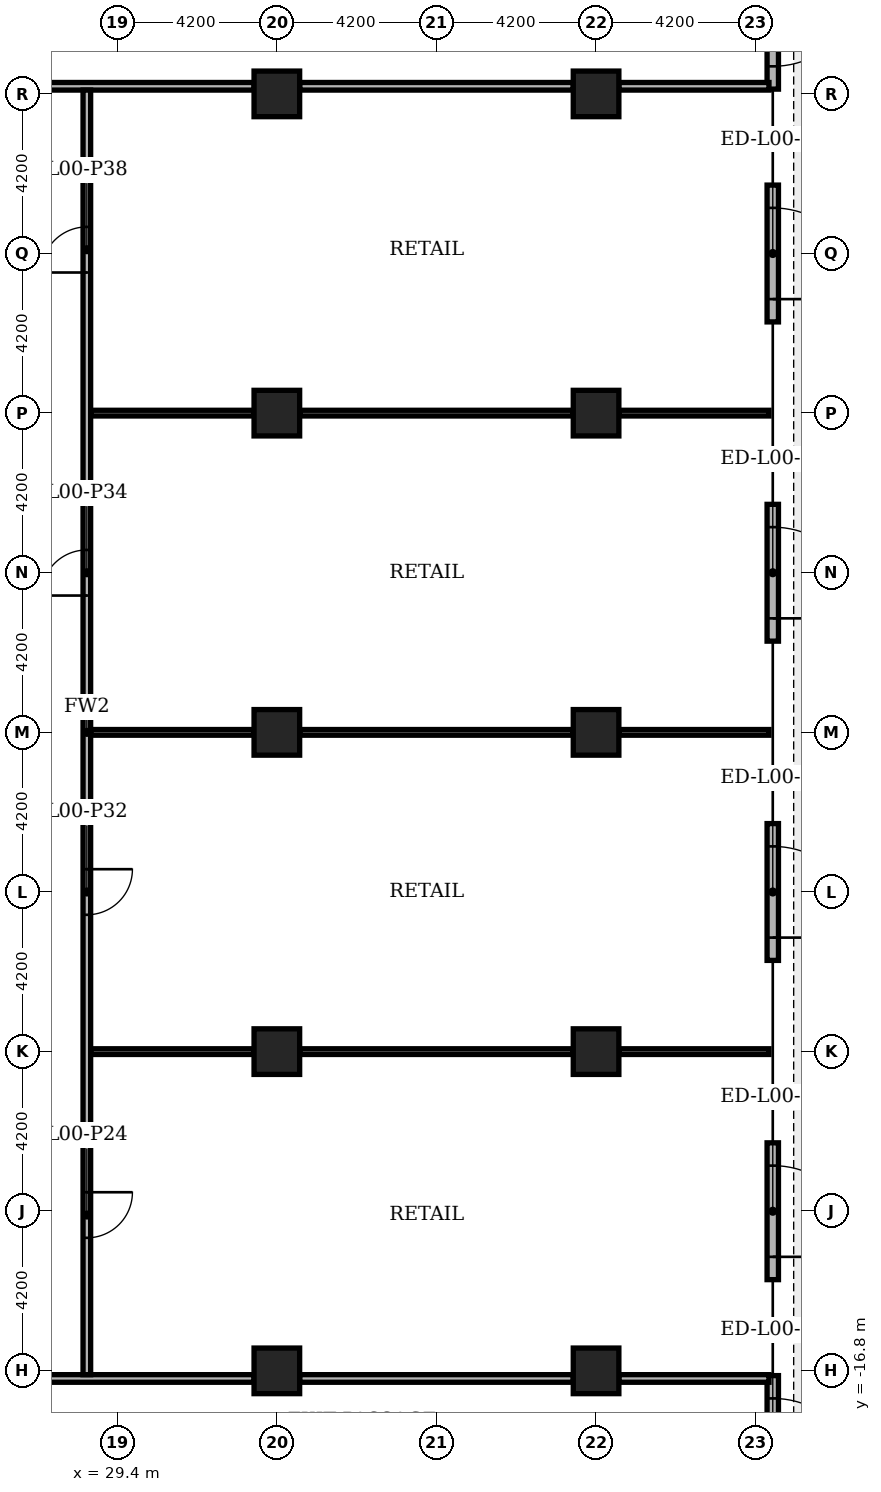
"""IFC4 building model, lengths in metres.
Left out: names, types, materials, properties, quantities, classifications, styles, units other than length and angle.
Written with IfcOpenShell. Run it as: python <this file> out.ifc"""

import sys

from ifc_helpers import new_model, si_unit, direction, frame, frame_2d, origin, origin_2d, place, context, subcontext, project, spatial, rectangle, extrude, element, fill, save


model = new_model("IFC4")
c1 = context("Model", 3, precision=1e-05, world=origin(), true_north=direction((0.0, 1.0)))
c2 = subcontext(c1, "Body", "Model", "MODEL_VIEW")
j1 = project(units=[si_unit("LENGTHUNIT", "METRE"), si_unit("PLANEANGLEUNIT", "RADIAN")], contexts=[c1])
p1 = place(None, origin())
s1 = spatial("IfcSite", under=j1, at=p1, CompositionType="ELEMENT")
p2 = place(p1, origin())
s2 = spatial("IfcBuilding", under=s1, at=p2, CompositionType="ELEMENT")
p3 = place(p2, origin())
s3 = spatial("IfcBuildingStorey", under=s2, at=p3, CompositionType="ELEMENT", Elevation=0.0)
for number, where, z_axis, x_axis in (
    (1, (33.6, 0.0, 0.0), (0.0, 0.0, 1.0), (1.0, 0.0, 0.0)),
    (2, (33.6, 8.4, 0.0), (0.0, 0.0, 1.0), (1.0, 0.0, 0.0)),
    (3, (33.6, 16.8, 0.0), (0.0, 0.0, 1.0), (1.0, 0.0, 0.0)),
    (4, (33.6, -8.4, 0.0), (0.0, 0.0, 1.0), (1.0, 0.0, 0.0)),
    (5, (33.6, -16.8, 0.0), (0.0, 0.0, 1.0), (1.0, 0.0, 0.0)),
    (6, (42.0, 0.0, 0.0), (0.0, 0.0, 1.0), (1.0, 0.0, 0.0)),
    (7, (42.0, 8.4, 0.0), (0.0, 0.0, 1.0), (1.0, 0.0, 0.0)),
    (8, (42.0, 16.8, 0.0), (0.0, 0.0, 1.0), (1.0, 0.0, 0.0)),
    (9, (42.0, -8.4, 0.0), (0.0, 0.0, 1.0), (1.0, 0.0, 0.0)),
    (10, (42.0, -16.8, 0.0), (0.0, 0.0, 1.0), (1.0, 0.0, 0.0)),
):
    element("IfcColumn", number, at=place(p3, frame(where, z_axis=z_axis, x_axis=x_axis)), inside=s3, PredefinedType="COLUMN", context=c2, shape_type="SweptSolid", body=[
        extrude(rectangle(XDim=1.2, YDim=1.2, at=origin_2d()), origin(), (0.0, 0.0, 1.0), 7.2),
    ])
p4 = place(p3, frame((46.65, -20.525, 0.0), z_axis=(0.0, 0.0, 1.0), x_axis=(0.0, 1.0, 0.0)))
e11 = element("IfcWall", 11, at=p4, inside=s3, PredefinedType="STANDARD", context=c2, shape_type="SweptSolid", body=[
    extrude(rectangle(XDim=3.6, YDim=0.3, at=frame_2d((1.8, 0.0))), origin(), (0.0, 0.0, 1.0), 6.78),
])
p5 = place(p4, frame((0.6, 0.0, 0.0)))
e12 = element("IfcOpeningElement", 12, at=p5, cuts=e11, PredefinedType="OPENING", context=c2, shape_type="SweptSolid", body=[
    extrude(rectangle(XDim=2.4, YDim=2.4, at=frame_2d((1.2, 1.2))), frame((0.0, 0.16, 0.0), z_axis=(0.0, -1.0, 0.0), x_axis=(1.0, 0.0, 0.0)), (0.0, 0.0, 1.0), 0.32),
])
p6 = place(p3, frame((46.65, -14.4, 0.0), z_axis=(0.0, 0.0, 1.0), x_axis=(0.0, 1.0, 0.0)))
e13 = element("IfcWall", 13, at=p6, inside=s3, PredefinedType="STANDARD", context=c2, shape_type="SweptSolid", body=[
    extrude(rectangle(XDim=3.6, YDim=0.3, at=frame_2d((1.8, 0.0))), origin(), (0.0, 0.0, 1.0), 6.78),
])
p7 = place(p6, frame((0.6, 0.0, 0.0)))
e14 = element("IfcOpeningElement", 14, at=p7, cuts=e13, PredefinedType="OPENING", context=c2, shape_type="SweptSolid", body=[
    extrude(rectangle(XDim=2.4, YDim=2.4, at=frame_2d((1.2, 1.2))), frame((0.0, 0.16, 0.0), z_axis=(0.0, -1.0, 0.0), x_axis=(1.0, 0.0, 0.0)), (0.0, 0.0, 1.0), 0.32),
])
p8 = place(p3, frame((46.65, -6.0, 0.0), z_axis=(0.0, 0.0, 1.0), x_axis=(0.0, 1.0, 0.0)))
e15 = element("IfcWall", 15, at=p8, inside=s3, PredefinedType="STANDARD", context=c2, shape_type="SweptSolid", body=[
    extrude(rectangle(XDim=3.6, YDim=0.3, at=frame_2d((1.8, 0.0))), origin(), (0.0, 0.0, 1.0), 6.78),
])
p9 = place(p8, frame((0.6, 0.0, 0.0)))
e16 = element("IfcOpeningElement", 16, at=p9, cuts=e15, PredefinedType="OPENING", context=c2, shape_type="SweptSolid", body=[
    extrude(rectangle(XDim=2.4, YDim=2.4, at=frame_2d((1.2, 1.2))), frame((0.0, 0.16, 0.0), z_axis=(0.0, -1.0, 0.0), x_axis=(1.0, 0.0, 0.0)), (0.0, 0.0, 1.0), 0.32),
])
p10 = place(p3, frame((46.65, 2.4, 0.0), z_axis=(0.0, 0.0, 1.0), x_axis=(0.0, 1.0, 0.0)))
e17 = element("IfcWall", 17, at=p10, inside=s3, PredefinedType="STANDARD", context=c2, shape_type="SweptSolid", body=[
    extrude(rectangle(XDim=3.6, YDim=0.3, at=frame_2d((1.8, 0.0))), origin(), (0.0, 0.0, 1.0), 6.78),
])
p11 = place(p10, frame((0.6, 0.0, 0.0)))
e18 = element("IfcOpeningElement", 18, at=p11, cuts=e17, PredefinedType="OPENING", context=c2, shape_type="SweptSolid", body=[
    extrude(rectangle(XDim=2.4, YDim=2.4, at=frame_2d((1.2, 1.2))), frame((0.0, 0.16, 0.0), z_axis=(0.0, -1.0, 0.0), x_axis=(1.0, 0.0, 0.0)), (0.0, 0.0, 1.0), 0.32),
])
p12 = place(p3, frame((46.65, 10.8, 0.0), z_axis=(0.0, 0.0, 1.0), x_axis=(0.0, 1.0, 0.0)))
e19 = element("IfcWall", 19, at=p12, inside=s3, PredefinedType="STANDARD", context=c2, shape_type="SweptSolid", body=[
    extrude(rectangle(XDim=3.6, YDim=0.3, at=frame_2d((1.8, 0.0))), origin(), (0.0, 0.0, 1.0), 6.78),
])
p13 = place(p12, frame((0.6, 0.0, 0.0)))
e20 = element("IfcOpeningElement", 20, at=p13, cuts=e19, PredefinedType="OPENING", context=c2, shape_type="SweptSolid", body=[
    extrude(rectangle(XDim=2.4, YDim=2.4, at=frame_2d((1.2, 1.2))), frame((0.0, 0.16, 0.0), z_axis=(0.0, -1.0, 0.0), x_axis=(1.0, 0.0, 0.0)), (0.0, 0.0, 1.0), 0.32),
])
p14 = place(p3, frame((46.65, 16.925, 0.0), z_axis=(0.0, 0.0, 1.0), x_axis=(0.0, 1.0, 0.0)))
e21 = element("IfcWall", 21, at=p14, inside=s3, PredefinedType="STANDARD", context=c2, shape_type="SweptSolid", body=[
    extrude(rectangle(XDim=3.6, YDim=0.3, at=frame_2d((1.8, 0.0))), origin(), (0.0, 0.0, 1.0), 6.78),
])
p15 = place(p14, frame((0.6, 0.0, 0.0)))
e22 = element("IfcOpeningElement", 22, at=p15, cuts=e21, PredefinedType="OPENING", context=c2, shape_type="SweptSolid", body=[
    extrude(rectangle(XDim=2.4, YDim=2.4, at=frame_2d((1.2, 1.2))), frame((0.0, 0.16, 0.0), z_axis=(0.0, -1.0, 0.0), x_axis=(1.0, 0.0, 0.0)), (0.0, 0.0, 1.0), 0.32),
])
for number, where, z_axis, x_axis in (
    (23, (25.8, -17.0, 0.0), (0.0, 0.0, 1.0), (1.0, 0.0, 0.0)),
    (24, (34.2, -17.0, 0.0), (0.0, 0.0, 1.0), (1.0, 0.0, 0.0)),
):
    element("IfcWall", number, at=place(p3, frame(where, z_axis=z_axis, x_axis=x_axis)), inside=s3, PredefinedType="PARTITIONING", context=c2, shape_type="SweptSolid", body=[
        extrude(rectangle(XDim=7.2, YDim=0.2, at=frame_2d((3.6, 0.0))), origin(), (0.0, 0.0, 1.0), 6.48),
    ])
p16 = place(p3, frame((42.6, -17.0, 0.0), z_axis=(0.0, 0.0, 1.0), x_axis=(1.0, 0.0, 0.0)))
e25 = element("IfcWall", 25, at=p16, inside=s3, PredefinedType="PARTITIONING", context=c2, shape_type="SweptSolid", body=[
    extrude(rectangle(XDim=3.95, YDim=0.2, at=frame_2d((1.975, 0.0))), origin(), (0.0, 0.0, 1.0), 6.48),
])
p17 = place(p3, frame((28.7, -8.4, 0.0), z_axis=(0.0, 0.0, 1.0), x_axis=(1.0, 0.0, 0.0)))
e26 = element("IfcWall", 26, at=p17, inside=s3, PredefinedType="PARTITIONING", context=c2, shape_type="SweptSolid", body=[
    extrude(rectangle(XDim=4.3, YDim=0.15, at=frame_2d((2.15, 0.0))), origin(), (0.0, 0.0, 1.0), 6.48),
])
p18 = place(p3, frame((34.2, -8.4, 0.0), z_axis=(0.0, 0.0, 1.0), x_axis=(1.0, 0.0, 0.0)))
e27 = element("IfcWall", 27, at=p18, inside=s3, PredefinedType="PARTITIONING", context=c2, shape_type="SweptSolid", body=[
    extrude(rectangle(XDim=7.2, YDim=0.15, at=frame_2d((3.6, 0.0))), origin(), (0.0, 0.0, 1.0), 6.48),
])
p19 = place(p3, frame((42.6, -8.4, 0.0), z_axis=(0.0, 0.0, 1.0), x_axis=(1.0, 0.0, 0.0)))
e28 = element("IfcWall", 28, at=p19, inside=s3, PredefinedType="PARTITIONING", context=c2, shape_type="SweptSolid", body=[
    extrude(rectangle(XDim=3.95, YDim=0.15, at=frame_2d((1.975, 0.0))), origin(), (0.0, 0.0, 1.0), 6.48),
])
p20 = place(p3, frame((28.7, 0.0, 0.0), z_axis=(0.0, 0.0, 1.0), x_axis=(1.0, 0.0, 0.0)))
e29 = element("IfcWall", 29, at=p20, inside=s3, PredefinedType="PARTITIONING", context=c2, shape_type="SweptSolid", body=[
    extrude(rectangle(XDim=4.3, YDim=0.15, at=frame_2d((2.15, 0.0))), origin(), (0.0, 0.0, 1.0), 6.48),
])
p21 = place(p3, frame((34.2, 0.0, 0.0), z_axis=(0.0, 0.0, 1.0), x_axis=(1.0, 0.0, 0.0)))
e30 = element("IfcWall", 30, at=p21, inside=s3, PredefinedType="PARTITIONING", context=c2, shape_type="SweptSolid", body=[
    extrude(rectangle(XDim=7.2, YDim=0.15, at=frame_2d((3.6, 0.0))), origin(), (0.0, 0.0, 1.0), 6.48),
])
p22 = place(p3, frame((42.6, 0.0, 0.0), z_axis=(0.0, 0.0, 1.0), x_axis=(1.0, 0.0, 0.0)))
e31 = element("IfcWall", 31, at=p22, inside=s3, PredefinedType="PARTITIONING", context=c2, shape_type="SweptSolid", body=[
    extrude(rectangle(XDim=3.95, YDim=0.15, at=frame_2d((1.975, 0.0))), origin(), (0.0, 0.0, 1.0), 6.48),
])
p23 = place(p3, frame((28.7, 8.4, 0.0), z_axis=(0.0, 0.0, 1.0), x_axis=(1.0, 0.0, 0.0)))
e32 = element("IfcWall", 32, at=p23, inside=s3, PredefinedType="PARTITIONING", context=c2, shape_type="SweptSolid", body=[
    extrude(rectangle(XDim=4.3, YDim=0.15, at=frame_2d((2.15, 0.0))), origin(), (0.0, 0.0, 1.0), 6.48),
])
p24 = place(p3, frame((34.2, 8.4, 0.0), z_axis=(0.0, 0.0, 1.0), x_axis=(1.0, 0.0, 0.0)))
e33 = element("IfcWall", 33, at=p24, inside=s3, PredefinedType="PARTITIONING", context=c2, shape_type="SweptSolid", body=[
    extrude(rectangle(XDim=7.2, YDim=0.15, at=frame_2d((3.6, 0.0))), origin(), (0.0, 0.0, 1.0), 6.48),
])
p25 = place(p3, frame((42.6, 8.4, 0.0), z_axis=(0.0, 0.0, 1.0), x_axis=(1.0, 0.0, 0.0)))
e34 = element("IfcWall", 34, at=p25, inside=s3, PredefinedType="PARTITIONING", context=c2, shape_type="SweptSolid", body=[
    extrude(rectangle(XDim=3.95, YDim=0.15, at=frame_2d((1.975, 0.0))), origin(), (0.0, 0.0, 1.0), 6.48),
])
for number, where, z_axis, x_axis in (
    (35, (25.8, 17.0, 0.0), (0.0, 0.0, 1.0), (1.0, 0.0, 0.0)),
    (36, (34.2, 17.0, 0.0), (0.0, 0.0, 1.0), (1.0, 0.0, 0.0)),
):
    element("IfcWall", number, at=place(p3, frame(where, z_axis=z_axis, x_axis=x_axis)), inside=s3, PredefinedType="PARTITIONING", context=c2, shape_type="SweptSolid", body=[
        extrude(rectangle(XDim=7.2, YDim=0.2, at=frame_2d((3.6, 0.0))), origin(), (0.0, 0.0, 1.0), 6.48),
    ])
p26 = place(p3, frame((42.6, 17.0, 0.0), z_axis=(0.0, 0.0, 1.0), x_axis=(1.0, 0.0, 0.0)))
e37 = element("IfcWall", 37, at=p26, inside=s3, PredefinedType="PARTITIONING", context=c2, shape_type="SweptSolid", body=[
    extrude(rectangle(XDim=3.95, YDim=0.2, at=frame_2d((1.975, 0.0))), origin(), (0.0, 0.0, 1.0), 6.48),
])
p27 = place(p3, frame((28.6, -16.9, 0.0), z_axis=(0.0, 0.0, 1.0), x_axis=(0.0, 1.0, 0.0)))
e38 = element("IfcWall", 38, at=p27, inside=s3, PredefinedType="PARTITIONING", context=c2, shape_type="SweptSolid", body=[
    extrude(rectangle(XDim=33.8, YDim=0.2, at=frame_2d((16.9, 0.0))), origin(), (0.0, 0.0, 1.0), 6.48),
])
p28 = place(p27, frame((3.6, 0.0, 0.0)))
e39 = element("IfcOpeningElement", 39, at=p28, cuts=e38, PredefinedType="OPENING", context=c2, shape_type="SweptSolid", body=[
    extrude(rectangle(XDim=1.2, YDim=2.2, at=frame_2d((0.6, 1.1))), frame((0.0, 0.11, 0.0), z_axis=(0.0, -1.0, 0.0), x_axis=(1.0, 0.0, 0.0)), (0.0, 0.0, 1.0), 0.22),
])
p29 = place(p27, frame((12.1, 0.0, 0.0)))
e40 = element("IfcOpeningElement", 40, at=p29, cuts=e38, PredefinedType="OPENING", context=c2, shape_type="SweptSolid", body=[
    extrude(rectangle(XDim=1.2, YDim=2.2, at=frame_2d((0.6, 1.1))), frame((0.0, 0.11, 0.0), z_axis=(0.0, -1.0, 0.0), x_axis=(1.0, 0.0, 0.0)), (0.0, 0.0, 1.0), 0.22),
])
p30 = place(p27, frame((20.5, 0.0, 0.0)))
e41 = element("IfcOpeningElement", 41, at=p30, cuts=e38, PredefinedType="OPENING", context=c2, shape_type="SweptSolid", body=[
    extrude(rectangle(XDim=1.2, YDim=2.2, at=frame_2d((0.6, 1.1))), frame((0.0, 0.11, 0.0), z_axis=(0.0, -1.0, 0.0), x_axis=(1.0, 0.0, 0.0)), (0.0, 0.0, 1.0), 0.22),
])
p31 = place(p27, frame((29.0, 0.0, 0.0)))
e42 = element("IfcOpeningElement", 42, at=p31, cuts=e38, PredefinedType="OPENING", context=c2, shape_type="SweptSolid", body=[
    extrude(rectangle(XDim=1.2, YDim=2.2, at=frame_2d((0.6, 1.1))), frame((0.0, 0.11, 0.0), z_axis=(0.0, -1.0, 0.0), x_axis=(1.0, 0.0, 0.0)), (0.0, 0.0, 1.0), 0.22),
])
p32 = place(p5, frame((2.4, 0.0, 0.0), z_axis=(0.0, 0.0, 1.0), x_axis=(-1.0, 0.0, 0.0)))
e43 = element("IfcDoor", 43, at=p32, inside=s3, OperationType="SINGLE_SWING_LEFT", PredefinedType="DOOR", context=c2, shape_type="SweptSolid", body=[
    extrude(rectangle(XDim=2.4, YDim=2.4, at=frame_2d((1.2, 1.2))), frame((0.0, 0.025, 0.0), z_axis=(0.0, -1.0, 0.0), x_axis=(1.0, 0.0, 0.0)), (0.0, 0.0, 1.0), 0.05),
])
fill(e12, e43)
p33 = place(p7, frame((2.4, 0.0, 0.0), z_axis=(0.0, 0.0, 1.0), x_axis=(-1.0, 0.0, 0.0)))
e44 = element("IfcDoor", 44, at=p33, inside=s3, OperationType="DOUBLE_DOOR_SINGLE_SWING", PredefinedType="DOOR", context=c2, shape_type="SweptSolid", body=[
    extrude(rectangle(XDim=2.4, YDim=2.4, at=frame_2d((1.2, 1.2))), frame((0.0, 0.025, 0.0), z_axis=(0.0, -1.0, 0.0), x_axis=(1.0, 0.0, 0.0)), (0.0, 0.0, 1.0), 0.05),
])
fill(e14, e44)
p34 = place(p9, frame((2.4, 0.0, 0.0), z_axis=(0.0, 0.0, 1.0), x_axis=(-1.0, 0.0, 0.0)))
e45 = element("IfcDoor", 45, at=p34, inside=s3, OperationType="DOUBLE_DOOR_SINGLE_SWING", PredefinedType="DOOR", context=c2, shape_type="SweptSolid", body=[
    extrude(rectangle(XDim=2.4, YDim=2.4, at=frame_2d((1.2, 1.2))), frame((0.0, 0.025, 0.0), z_axis=(0.0, -1.0, 0.0), x_axis=(1.0, 0.0, 0.0)), (0.0, 0.0, 1.0), 0.05),
])
fill(e16, e45)
p35 = place(p11, frame((2.4, 0.0, 0.0), z_axis=(0.0, 0.0, 1.0), x_axis=(-1.0, 0.0, 0.0)))
e46 = element("IfcDoor", 46, at=p35, inside=s3, OperationType="DOUBLE_DOOR_SINGLE_SWING", PredefinedType="DOOR", context=c2, shape_type="SweptSolid", body=[
    extrude(rectangle(XDim=2.4, YDim=2.4, at=frame_2d((1.2, 1.2))), frame((0.0, 0.025, 0.0), z_axis=(0.0, -1.0, 0.0), x_axis=(1.0, 0.0, 0.0)), (0.0, 0.0, 1.0), 0.05),
])
fill(e18, e46)
p36 = place(p13, frame((2.4, 0.0, 0.0), z_axis=(0.0, 0.0, 1.0), x_axis=(-1.0, 0.0, 0.0)))
e47 = element("IfcDoor", 47, at=p36, inside=s3, OperationType="DOUBLE_DOOR_SINGLE_SWING", PredefinedType="DOOR", context=c2, shape_type="SweptSolid", body=[
    extrude(rectangle(XDim=2.4, YDim=2.4, at=frame_2d((1.2, 1.2))), frame((0.0, 0.025, 0.0), z_axis=(0.0, -1.0, 0.0), x_axis=(1.0, 0.0, 0.0)), (0.0, 0.0, 1.0), 0.05),
])
fill(e20, e47)
p37 = place(p15, frame((2.4, 0.0, 0.0), z_axis=(0.0, 0.0, 1.0), x_axis=(-1.0, 0.0, 0.0)))
e48 = element("IfcDoor", 48, at=p37, inside=s3, OperationType="SINGLE_SWING_RIGHT", PredefinedType="DOOR", context=c2, shape_type="SweptSolid", body=[
    extrude(rectangle(XDim=2.4, YDim=2.4, at=frame_2d((1.2, 1.2))), frame((0.0, 0.025, 0.0), z_axis=(0.0, -1.0, 0.0), x_axis=(1.0, 0.0, 0.0)), (0.0, 0.0, 1.0), 0.05),
])
fill(e22, e48)
p38 = place(p28, origin())
e49 = element("IfcDoor", 49, at=p38, inside=s3, OperationType="SINGLE_SWING_RIGHT", PredefinedType="DOOR", context=c2, shape_type="SweptSolid", body=[
    extrude(rectangle(XDim=1.2, YDim=2.2, at=frame_2d((0.6, 1.1))), frame((0.0, 0.025, 0.0), z_axis=(0.0, -1.0, 0.0), x_axis=(1.0, 0.0, 0.0)), (0.0, 0.0, 1.0), 0.05),
])
fill(e39, e49)
p39 = place(p29, origin())
e50 = element("IfcDoor", 50, at=p39, inside=s3, OperationType="SINGLE_SWING_RIGHT", PredefinedType="DOOR", context=c2, shape_type="SweptSolid", body=[
    extrude(rectangle(XDim=1.2, YDim=2.2, at=frame_2d((0.6, 1.1))), frame((0.0, 0.025, 0.0), z_axis=(0.0, -1.0, 0.0), x_axis=(1.0, 0.0, 0.0)), (0.0, 0.0, 1.0), 0.05),
])
fill(e40, e50)
p40 = place(p30, origin())
e51 = element("IfcDoor", 51, at=p40, inside=s3, OperationType="SINGLE_SWING_LEFT", PredefinedType="DOOR", context=c2, shape_type="SweptSolid", body=[
    extrude(rectangle(XDim=1.2, YDim=2.2, at=frame_2d((0.6, 1.1))), frame((0.0, 0.025, 0.0), z_axis=(0.0, -1.0, 0.0), x_axis=(1.0, 0.0, 0.0)), (0.0, 0.0, 1.0), 0.05),
])
fill(e41, e51)
p41 = place(p31, origin())
e52 = element("IfcDoor", 52, at=p41, inside=s3, OperationType="SINGLE_SWING_LEFT", PredefinedType="DOOR", context=c2, shape_type="SweptSolid", body=[
    extrude(rectangle(XDim=1.2, YDim=2.2, at=frame_2d((0.6, 1.1))), frame((0.0, 0.025, 0.0), z_axis=(0.0, -1.0, 0.0), x_axis=(1.0, 0.0, 0.0)), (0.0, 0.0, 1.0), 0.05),
])
fill(e42, e52)
save(model, sys.argv[1])
